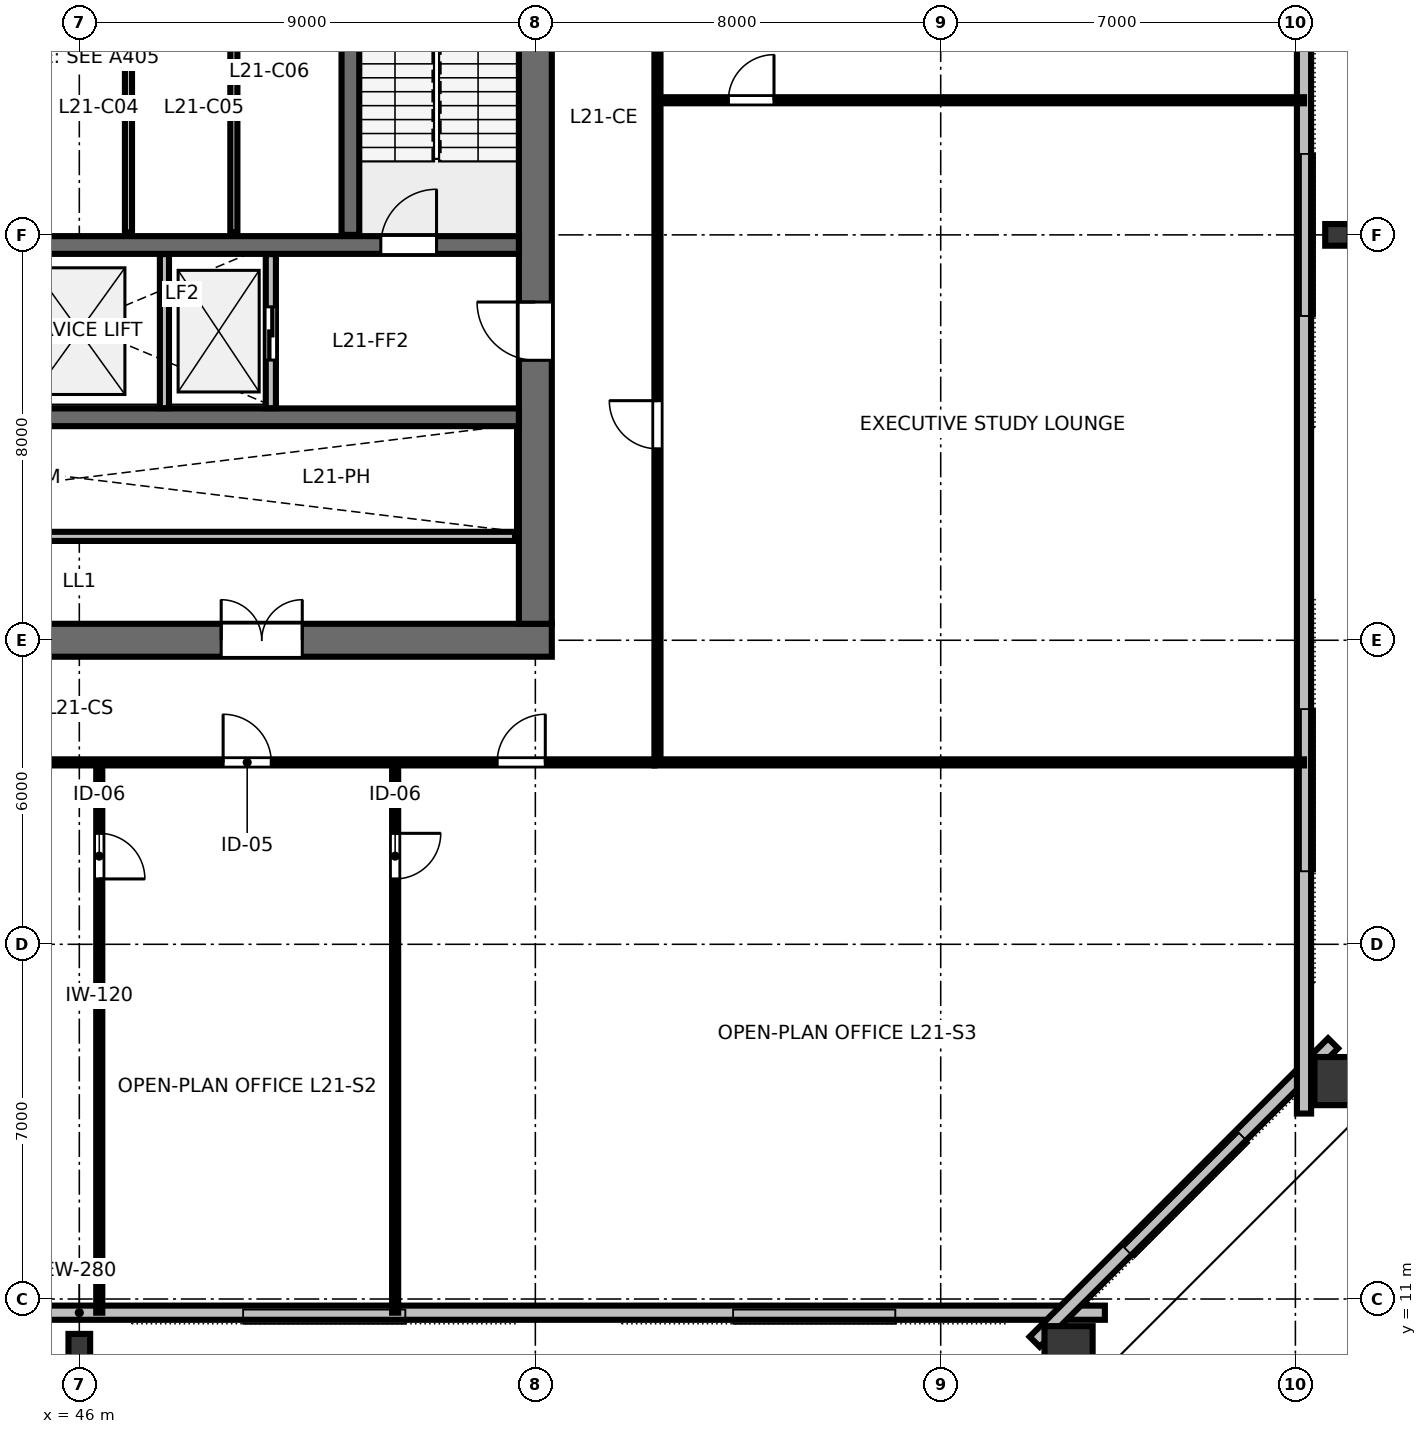
"""IFC4 building model, lengths in metres.
Left out: names, types, materials, properties, quantities, classifications, styles, units other than length and angle.
Written with IfcOpenShell. Run it as: python <this file> out.ifc"""

import sys

from ifc_helpers import new_model, si_unit, direction, frame, frame_2d, origin, origin_2d, place, context, subcontext, project, spatial, rectangle, hollow_rectangle, i_section, extrude, element, fill, save


model = new_model("IFC4")
c1 = context("Model", 3, precision=1e-05, world=origin(), true_north=direction((0.0, 1.0)))
c2 = subcontext(c1, "Body", "Model", "MODEL_VIEW")
j1 = project(units=[si_unit("LENGTHUNIT", "METRE"), si_unit("PLANEANGLEUNIT", "RADIAN")], contexts=[c1])
p1 = place(None, origin())
s1 = spatial("IfcSite", under=j1, at=p1, CompositionType="ELEMENT")
p2 = place(p1, origin())
s2 = spatial("IfcBuilding", under=s1, at=p2, CompositionType="ELEMENT")
p3 = place(p2, frame((0.0, 0.0, 82.0)))
s3 = spatial("IfcBuildingStorey", under=s2, at=p3, CompositionType="ELEMENT", Elevation=82.0)
p4 = place(p3, frame((36.675, 24.0, 0.0), z_axis=(0.0, 0.0, 1.0), x_axis=(1.0, 0.0, 0.0)))
e1 = element("IfcWall", 1, at=p4, inside=s3, PredefinedType="SHEAR", context=c2, shape_type="SweptSolid", body=[
    extrude(rectangle(XDim=18.65, YDim=0.65, at=frame_2d((9.325, 0.0))), origin(), (0.0, 0.0, 1.0), 3.28),
])
p5 = place(p4, frame((5.725, 0.0, 0.0)))
e2 = element("IfcOpeningElement", 2, at=p5, cuts=e1, PredefinedType="OPENING", context=c2, shape_type="SweptSolid", body=[
    extrude(rectangle(XDim=1.6, YDim=2.15, at=frame_2d((0.8, 1.075))), frame((0.0, 0.335, 0.0), z_axis=(0.0, -1.0, 0.0), x_axis=(1.0, 0.0, 0.0)), (0.0, 0.0, 1.0), 0.67),
])
p6 = place(p4, frame((12.125, 0.0, 0.0)))
e3 = element("IfcOpeningElement", 3, at=p6, cuts=e1, PredefinedType="OPENING", context=c2, shape_type="SweptSolid", body=[
    extrude(rectangle(XDim=1.6, YDim=2.15, at=frame_2d((0.8, 1.075))), frame((0.0, 0.335, 0.0), z_axis=(0.0, -1.0, 0.0), x_axis=(1.0, 0.0, 0.0)), (0.0, 0.0, 1.0), 0.67),
])
p7 = place(p3, frame((55.0, 24.325, 0.0), z_axis=(0.0, 0.0, 1.0), x_axis=(0.0, 1.0, 0.0)))
e4 = element("IfcWall", 4, at=p7, inside=s3, PredefinedType="SHEAR", context=c2, shape_type="SweptSolid", body=[
    extrude(rectangle(XDim=15.35, YDim=0.65, at=frame_2d((7.675, 0.0))), origin(), (0.0, 0.0, 1.0), 3.28),
])
p8 = place(p7, frame((5.2, 0.0, 0.0)))
e5 = element("IfcOpeningElement", 5, at=p8, cuts=e4, PredefinedType="OPENING", context=c2, shape_type="SweptSolid", body=[
    extrude(rectangle(XDim=1.15, YDim=2.15, at=frame_2d((0.575, 1.075))), frame((0.0, 0.335, 0.0), z_axis=(0.0, -1.0, 0.0), x_axis=(1.0, 0.0, 0.0)), (0.0, 0.0, 1.0), 0.67),
])
p9 = place(p3, frame((37.325, 31.8, 0.0), z_axis=(0.0, 0.0, 1.0), x_axis=(1.0, 0.0, 0.0)))
e6 = element("IfcWall", 6, at=p9, inside=s3, PredefinedType="SHEAR", context=c2, shape_type="SweptSolid", body=[
    extrude(rectangle(XDim=17.35, YDim=0.35, at=frame_2d((8.675, 0.0))), origin(), (0.0, 0.0, 1.0), 3.28),
])
p10 = place(p9, frame((0.725, 0.0, 0.0)))
e7 = element("IfcOpeningElement", 7, at=p10, cuts=e6, PredefinedType="OPENING", context=c2, shape_type="SweptSolid", body=[
    extrude(rectangle(XDim=1.1, YDim=2.15, at=frame_2d((0.55, 1.075))), frame((0.0, 0.185, 0.0), z_axis=(0.0, -1.0, 0.0), x_axis=(1.0, 0.0, 0.0)), (0.0, 0.0, 1.0), 0.37),
])
p11 = place(p9, frame((14.625, 0.0, 0.0)))
e8 = element("IfcOpeningElement", 8, at=p11, cuts=e6, PredefinedType="OPENING", context=c2, shape_type="SweptSolid", body=[
    extrude(rectangle(XDim=1.1, YDim=2.15, at=frame_2d((0.55, 1.075))), frame((0.0, 0.185, 0.0), z_axis=(0.0, -1.0, 0.0), x_axis=(1.0, 0.0, 0.0)), (0.0, 0.0, 1.0), 0.37),
])
p12 = place(p3, frame((37.325, 28.4, 0.0), z_axis=(0.0, 0.0, 1.0), x_axis=(1.0, 0.0, 0.0)))
e9 = element("IfcWall", 9, at=p12, inside=s3, PredefinedType="SHEAR", context=c2, shape_type="SweptSolid", body=[
    extrude(rectangle(XDim=17.35, YDim=0.35, at=frame_2d((8.675, 0.0))), origin(), (0.0, 0.0, 1.0), 3.28),
])
p13 = place(p3, frame((46.0, 10.07, 0.0), z_axis=(0.0, 0.055844793021, 0.998439461907), x_axis=(-1.0, 0.0, 0.0)))
e10 = element("IfcColumn", 10, at=p13, inside=s3, PredefinedType="COLUMN", context=c2, shape_type="SweptSolid", body=[
    extrude(i_section(OverallWidth=0.428, OverallDepth=0.483, WebThickness=0.051, FlangeThickness=0.082, FilletRadius=0.025, at=origin_2d()), origin(), (0.0, 0.0, 1.0), 3.283),
])
p14 = place(p3, frame((65.523, 9.89, 0.0), z_axis=(-0.080491878848, 0.056033020634, 0.99517905828), x_axis=(-0.571330166379, -0.82072031837, 0.0)))
e11 = element("IfcColumn", 11, at=p14, inside=s3, PredefinedType="COLUMN", context=c2, shape_type="SweptSolid", body=[
    extrude(hollow_rectangle(XDim=0.95, YDim=1.15, WallThickness=0.06, at=origin_2d()), origin(), (0.0, 0.0, 1.0), 3.294),
])
p15 = place(p3, frame((70.952, 15.301, 0.0), z_axis=(-0.066122964366, 0.070348310744, 0.995328523031), x_axis=(0.6816861236, -0.725246783964, 0.096546005827)))
e12 = element("IfcColumn", 12, at=p15, inside=s3, PredefinedType="COLUMN", context=c2, shape_type="SweptSolid", body=[
    extrude(hollow_rectangle(XDim=0.95, YDim=1.15, WallThickness=0.06, at=origin_2d()), origin(), (0.0, 0.0, 1.0), 3.293),
])
p16 = place(p3, frame((70.83, 32.0, 0.0), z_axis=(-0.06599123705, 0.0, 0.997820202558), x_axis=(0.997820202558, 0.0, 0.06599123705)))
e13 = element("IfcColumn", 13, at=p16, inside=s3, PredefinedType="COLUMN", context=c2, shape_type="SweptSolid", body=[
    extrude(i_section(OverallWidth=0.428, OverallDepth=0.483, WebThickness=0.051, FlangeThickness=0.082, FilletRadius=0.025, at=origin_2d()), origin(), (0.0, 0.0, 1.0), 3.285),
])
p17 = place(p3, frame((25.76, 10.73, 0.0), z_axis=(0.0, 0.0, 1.0), x_axis=(1.0, 0.0, 0.0)))
e14 = element("IfcWall", 14, at=p17, inside=s3, PredefinedType="STANDARD", context=c2, shape_type="SweptSolid", body=[
    extrude(rectangle(XDim=40.48, YDim=0.28, at=frame_2d((20.24, 0.0))), origin(), (0.0, 0.0, 1.0), 3.28),
])
p18 = place(p3, frame((64.854, 10.156, 0.0), z_axis=(0.0, 0.0, 1.0), x_axis=(0.707106781187, 0.707106781187, 0.0)))
e15 = element("IfcWall", 15, at=p18, inside=s3, PredefinedType="STANDARD", context=c2, shape_type="SweptSolid", body=[
    extrude(rectangle(XDim=8.329, YDim=0.28, at=frame_2d((4.165, 0.0))), origin(), (0.0, 0.0, 1.0), 2.343),
])
p19 = place(p3, frame((70.17, 14.66, 0.0), z_axis=(0.0, 0.0, 1.0), x_axis=(0.0, 1.0, 0.0)))
e16 = element("IfcWall", 16, at=p19, inside=s3, PredefinedType="STANDARD", context=c2, shape_type="SweptSolid", body=[
    extrude(rectangle(XDim=34.68, YDim=0.28, at=frame_2d((17.34, 0.0))), origin(), (0.0, 0.0, 1.0), 3.28),
])
p20 = place(p3, frame((51.35, 32.0, 0.0), z_axis=(0.0, 0.0, 1.0), x_axis=(0.0, 1.0, 0.0)))
e17 = element("IfcWall", 17, at=p20, inside=s3, PredefinedType="SHEAR", context=c2, shape_type="SweptSolid", body=[
    extrude(rectangle(XDim=7.7, YDim=0.35, at=frame_2d((3.85, 0.0))), origin(), (0.0, 0.0, 1.0), 3.6),
])
for number, where, z_axis, x_axis in (
    (18, (46.97, 32.05, 0.0), (0.0, 0.0, 1.0), (0.0, 1.0, 0.0)),
    (19, (49.05, 32.05, 0.0), (0.0, 0.0, 1.0), (0.0, 1.0, 0.0)),
):
    element("IfcWall", number, at=place(p3, frame(where, z_axis=z_axis, x_axis=x_axis)), inside=s3, PredefinedType="PARTITIONING", context=c2, shape_type="SweptSolid", body=[
        extrude(rectangle(XDim=5.5, YDim=0.14, at=frame_2d((2.75, 0.0))), origin(), (0.0, 0.0, 1.0), 3.28),
    ])
p21 = place(p3, frame((49.78, 28.58, 0.0), z_axis=(0.0, 0.0, 1.0), x_axis=(0.0, 1.0, 0.0)))
e20 = element("IfcWall", 20, at=p21, inside=s3, PredefinedType="PARTITIONING", context=c2, shape_type="SweptSolid", body=[
    extrude(rectangle(XDim=3.04, YDim=0.2, at=frame_2d((1.52, 0.0))), origin(), (0.0, 0.0, 1.0), 3.28),
])
p22 = place(p21, frame((0.95, 0.0, 0.0)))
e21 = element("IfcOpeningElement", 21, at=p22, cuts=e20, PredefinedType="OPENING", context=c2, shape_type="SweptSolid", body=[
    extrude(rectangle(XDim=1.05, YDim=2.15, at=frame_2d((0.525, 1.075))), frame((0.0, 0.11, 0.0), z_axis=(0.0, -1.0, 0.0), x_axis=(1.0, 0.0, 0.0)), (0.0, 0.0, 1.0), 0.22),
])
p23 = place(p3, frame((47.68, 28.58, 0.0), z_axis=(0.0, 0.0, 1.0), x_axis=(0.0, 1.0, 0.0)))
e22 = element("IfcWall", 22, at=p23, inside=s3, PredefinedType="PARTITIONING", context=c2, shape_type="SweptSolid", body=[
    extrude(rectangle(XDim=3.04, YDim=0.18, at=frame_2d((1.52, 0.0))), origin(), (0.0, 0.0, 1.0), 3.28),
])
p24 = place(p3, frame((37.4, 26.05, 0.0), z_axis=(0.0, 0.0, 1.0), x_axis=(1.0, 0.0, 0.0)))
e23 = element("IfcWall", 23, at=p24, inside=s3, PredefinedType="PARTITIONING", context=c2, shape_type="SweptSolid", body=[
    extrude(rectangle(XDim=17.2, YDim=0.18, at=frame_2d((8.6, 0.0))), origin(), (0.0, 0.0, 1.0), 3.28),
])
p25 = place(p24, frame((1.1, 0.0, 0.0)))
e24 = element("IfcOpeningElement", 24, at=p25, cuts=e23, PredefinedType="OPENING", context=c2, shape_type="SweptSolid", body=[
    extrude(rectangle(XDim=1.05, YDim=2.15, at=frame_2d((0.525, 1.075))), frame((0.0, 0.1, 0.0), z_axis=(0.0, -1.0, 0.0), x_axis=(1.0, 0.0, 0.0)), (0.0, 0.0, 1.0), 0.2),
])
p26 = place(p24, frame((3.0, 0.0, 0.0)))
e25 = element("IfcOpeningElement", 25, at=p26, cuts=e23, PredefinedType="OPENING", context=c2, shape_type="SweptSolid", body=[
    extrude(rectangle(XDim=1.05, YDim=2.15, at=frame_2d((0.525, 1.075))), frame((0.0, 0.1, 0.0), z_axis=(0.0, -1.0, 0.0), x_axis=(1.0, 0.0, 0.0)), (0.0, 0.0, 1.0), 0.2),
])
p27 = place(p3, frame((46.394, 21.59, 0.0), z_axis=(0.0, 0.0, 1.0), x_axis=(0.0, -1.0, 0.0)))
e26 = element("IfcWall", 26, at=p27, inside=s3, PredefinedType="PARTITIONING", context=c2, shape_type="SweptSolid", body=[
    extrude(rectangle(XDim=10.86, YDim=0.12, at=frame_2d((5.43, 0.0))), origin(), (0.0, 0.0, 1.0), 2.56),
])
p28 = place(p27, frame((1.4, 0.0, 0.0)))
e27 = element("IfcOpeningElement", 27, at=p28, cuts=e26, PredefinedType="OPENING", context=c2, shape_type="SweptSolid", body=[
    extrude(rectangle(XDim=0.9, YDim=2.15, at=frame_2d((0.45, 1.075))), frame((0.0, 0.07, 0.0), z_axis=(0.0, -1.0, 0.0), x_axis=(1.0, 0.0, 0.0)), (0.0, 0.0, 1.0), 0.14),
])
p29 = place(p3, frame((52.233, 21.59, 0.0), z_axis=(0.0, 0.0, 1.0), x_axis=(0.0, -1.0, 0.0)))
e28 = element("IfcWall", 28, at=p29, inside=s3, PredefinedType="PARTITIONING", context=c2, shape_type="SweptSolid", body=[
    extrude(rectangle(XDim=10.86, YDim=0.12, at=frame_2d((5.43, 0.0))), origin(), (0.0, 0.0, 1.0), 2.56),
])
p30 = place(p29, frame((1.4, 0.0, 0.0)))
e29 = element("IfcOpeningElement", 29, at=p30, cuts=e28, PredefinedType="OPENING", context=c2, shape_type="SweptSolid", body=[
    extrude(rectangle(XDim=0.9, YDim=2.15, at=frame_2d((0.45, 1.075))), frame((0.0, 0.07, 0.0), z_axis=(0.0, -1.0, 0.0), x_axis=(1.0, 0.0, 0.0)), (0.0, 0.0, 1.0), 0.14),
])
p31 = place(p3, frame((34.65, 21.59, 0.0), z_axis=(0.0, 0.0, 1.0), x_axis=(1.0, 0.0, 0.0)))
e30 = element("IfcWall", 30, at=p31, inside=s3, PredefinedType="PARTITIONING", context=c2, shape_type="SweptSolid", body=[
    extrude(rectangle(XDim=22.7, YDim=0.12, at=frame_2d((11.35, 0.0))), origin(), (0.0, 0.0, 1.0), 2.56),
])
p32 = place(p31, frame((5.467, 0.0, 0.0)))
e31 = element("IfcOpeningElement", 31, at=p32, cuts=e30, PredefinedType="OPENING", context=c2, shape_type="SweptSolid", body=[
    extrude(rectangle(XDim=0.95, YDim=2.15, at=frame_2d((0.475, 1.075))), frame((0.0, 0.07, 0.0), z_axis=(0.0, -1.0, 0.0), x_axis=(1.0, 0.0, 0.0)), (0.0, 0.0, 1.0), 0.14),
])
p33 = place(p31, frame((14.188, 0.0, 0.0)))
e32 = element("IfcOpeningElement", 32, at=p33, cuts=e30, PredefinedType="OPENING", context=c2, shape_type="SweptSolid", body=[
    extrude(rectangle(XDim=0.95, YDim=2.15, at=frame_2d((0.475, 1.075))), frame((0.0, 0.07, 0.0), z_axis=(0.0, -1.0, 0.0), x_axis=(1.0, 0.0, 0.0)), (0.0, 0.0, 1.0), 0.14),
])
p34 = place(p31, frame((19.596, 0.0, 0.0)))
e33 = element("IfcOpeningElement", 33, at=p34, cuts=e30, PredefinedType="OPENING", context=c2, shape_type="SweptSolid", body=[
    extrude(rectangle(XDim=0.95, YDim=2.15, at=frame_2d((0.475, 1.075))), frame((0.0, 0.07, 0.0), z_axis=(0.0, -1.0, 0.0), x_axis=(1.0, 0.0, 0.0)), (0.0, 0.0, 1.0), 0.14),
])
p35 = place(p3, frame((57.41, 34.656, 0.0), z_axis=(0.0, 0.0, 1.0), x_axis=(1.0, 0.0, 0.0)))
e34 = element("IfcWall", 34, at=p35, inside=s3, PredefinedType="PARTITIONING", context=c2, shape_type="SweptSolid", body=[
    extrude(rectangle(XDim=12.76, YDim=0.12, at=frame_2d((6.38, 0.0))), origin(), (0.0, 0.0, 1.0), 2.56),
])
p36 = place(p35, frame((1.4, 0.0, 0.0)))
e35 = element("IfcOpeningElement", 35, at=p36, cuts=e34, PredefinedType="OPENING", context=c2, shape_type="SweptSolid", body=[
    extrude(rectangle(XDim=0.9, YDim=2.15, at=frame_2d((0.45, 1.075))), frame((0.0, 0.07, 0.0), z_axis=(0.0, -1.0, 0.0), x_axis=(1.0, 0.0, 0.0)), (0.0, 0.0, 1.0), 0.14),
])
p37 = place(p3, frame((57.41, 21.65, 0.0), z_axis=(0.0, 0.0, 1.0), x_axis=(0.0, 1.0, 0.0)))
e36 = element("IfcWall", 36, at=p37, inside=s3, PredefinedType="PARTITIONING", context=c2, shape_type="SweptSolid", body=[
    extrude(rectangle(XDim=20.7, YDim=0.12, at=frame_2d((10.35, 0.0))), origin(), (0.0, 0.0, 1.0), 2.56),
])
p38 = place(p37, frame((6.128, 0.0, 0.0)))
e37 = element("IfcOpeningElement", 37, at=p38, cuts=e36, PredefinedType="OPENING", context=c2, shape_type="SweptSolid", body=[
    extrude(rectangle(XDim=0.95, YDim=2.15, at=frame_2d((0.475, 1.075))), frame((0.0, 0.07, 0.0), z_axis=(0.0, -1.0, 0.0), x_axis=(1.0, 0.0, 0.0)), (0.0, 0.0, 1.0), 0.14),
])
p39 = place(p37, frame((16.278, 0.0, 0.0)))
e38 = element("IfcOpeningElement", 38, at=p39, cuts=e36, PredefinedType="OPENING", context=c2, shape_type="SweptSolid", body=[
    extrude(rectangle(XDim=0.95, YDim=2.15, at=frame_2d((0.475, 1.075))), frame((0.0, 0.07, 0.0), z_axis=(0.0, -1.0, 0.0), x_axis=(1.0, 0.0, 0.0)), (0.0, 0.0, 1.0), 0.14),
])
p40 = place(p3, frame((57.35, 21.59, 0.0), z_axis=(0.0, 0.0, 1.0), x_axis=(1.0, 0.0, 0.0)))
e39 = element("IfcWall", 39, at=p40, inside=s3, PredefinedType="PARTITIONING", context=c2, shape_type="SweptSolid", body=[
    extrude(rectangle(XDim=12.82, YDim=0.12, at=frame_2d((6.41, 0.0))), origin(), (0.0, 0.0, 1.0), 2.56),
])
p41 = place(p11, origin())
e40 = element("IfcDoor", 40, at=p41, inside=s3, OperationType="SINGLE_SWING_RIGHT", PredefinedType="DOOR", context=c2, shape_type="SweptSolid", body=[
    extrude(rectangle(XDim=1.1, YDim=2.15, at=frame_2d((0.55, 1.075))), frame((0.0, 0.025, 0.0), z_axis=(0.0, -1.0, 0.0), x_axis=(1.0, 0.0, 0.0)), (0.0, 0.0, 1.0), 0.05),
])
fill(e8, e40)
p42 = place(p8, origin())
e41 = element("IfcDoor", 41, at=p42, inside=s3, OperationType="SINGLE_SWING_RIGHT", PredefinedType="DOOR", context=c2, shape_type="SweptSolid", body=[
    extrude(rectangle(XDim=1.15, YDim=2.15, at=frame_2d((0.575, 1.075))), frame((0.0, 0.025, 0.0), z_axis=(0.0, -1.0, 0.0), x_axis=(1.0, 0.0, 0.0)), (0.0, 0.0, 1.0), 0.05),
])
fill(e5, e41)
p43 = place(p6, origin())
e42 = element("IfcDoor", 42, at=p43, inside=s3, OperationType="DOUBLE_DOOR_SINGLE_SWING", PredefinedType="DOOR", context=c2, shape_type="SweptSolid", body=[
    extrude(rectangle(XDim=1.6, YDim=2.15, at=frame_2d((0.8, 1.075))), frame((0.0, 0.025, 0.0), z_axis=(0.0, -1.0, 0.0), x_axis=(1.0, 0.0, 0.0)), (0.0, 0.0, 1.0), 0.05),
])
fill(e3, e42)
p44 = place(p22, origin())
e43 = element("IfcDoor", 43, at=p44, inside=s3, OperationType="SLIDING_TO_RIGHT", PredefinedType="DOOR", context=c2, shape_type="SweptSolid", body=[
    extrude(rectangle(XDim=1.05, YDim=2.15, at=frame_2d((0.525, 1.075))), frame((0.0, 0.025, 0.0), z_axis=(0.0, -1.0, 0.0), x_axis=(1.0, 0.0, 0.0)), (0.0, 0.0, 1.0), 0.05),
])
fill(e21, e43)
p45 = place(p28, origin())
e44 = element("IfcDoor", 44, at=p45, inside=s3, OperationType="SINGLE_SWING_RIGHT", PredefinedType="DOOR", context=c2, shape_type="SweptSolid", body=[
    extrude(rectangle(XDim=0.9, YDim=2.15, at=frame_2d((0.45, 1.075))), frame((0.0, 0.025, 0.0), z_axis=(0.0, -1.0, 0.0), x_axis=(1.0, 0.0, 0.0)), (0.0, 0.0, 1.0), 0.05),
])
fill(e27, e44)
p46 = place(p30, origin())
e45 = element("IfcDoor", 45, at=p46, inside=s3, OperationType="SINGLE_SWING_LEFT", PredefinedType="DOOR", context=c2, shape_type="SweptSolid", body=[
    extrude(rectangle(XDim=0.9, YDim=2.15, at=frame_2d((0.45, 1.075))), frame((0.0, 0.025, 0.0), z_axis=(0.0, -1.0, 0.0), x_axis=(1.0, 0.0, 0.0)), (0.0, 0.0, 1.0), 0.05),
])
fill(e29, e45)
p47 = place(p33, origin())
e46 = element("IfcDoor", 46, at=p47, inside=s3, OperationType="SINGLE_SWING_LEFT", PredefinedType="DOOR", context=c2, shape_type="SweptSolid", body=[
    extrude(rectangle(XDim=0.95, YDim=2.15, at=frame_2d((0.475, 1.075))), frame((0.0, 0.025, 0.0), z_axis=(0.0, -1.0, 0.0), x_axis=(1.0, 0.0, 0.0)), (0.0, 0.0, 1.0), 0.05),
])
fill(e32, e46)
p48 = place(p34, origin())
e47 = element("IfcDoor", 47, at=p48, inside=s3, OperationType="SINGLE_SWING_RIGHT", PredefinedType="DOOR", context=c2, shape_type="SweptSolid", body=[
    extrude(rectangle(XDim=0.95, YDim=2.15, at=frame_2d((0.475, 1.075))), frame((0.0, 0.025, 0.0), z_axis=(0.0, -1.0, 0.0), x_axis=(1.0, 0.0, 0.0)), (0.0, 0.0, 1.0), 0.05),
])
fill(e33, e47)
p49 = place(p36, origin())
e48 = element("IfcDoor", 48, at=p49, inside=s3, OperationType="SINGLE_SWING_RIGHT", PredefinedType="DOOR", context=c2, shape_type="SweptSolid", body=[
    extrude(rectangle(XDim=0.9, YDim=2.15, at=frame_2d((0.45, 1.075))), frame((0.0, 0.025, 0.0), z_axis=(0.0, -1.0, 0.0), x_axis=(1.0, 0.0, 0.0)), (0.0, 0.0, 1.0), 0.05),
])
fill(e35, e48)
p50 = place(p38, origin())
e49 = element("IfcDoor", 49, at=p50, inside=s3, OperationType="SINGLE_SWING_RIGHT", PredefinedType="DOOR", context=c2, shape_type="SweptSolid", body=[
    extrude(rectangle(XDim=0.95, YDim=2.15, at=frame_2d((0.475, 1.075))), frame((0.0, 0.025, 0.0), z_axis=(0.0, -1.0, 0.0), x_axis=(1.0, 0.0, 0.0)), (0.0, 0.0, 1.0), 0.05),
])
fill(e37, e49)
save(model, sys.argv[1])
